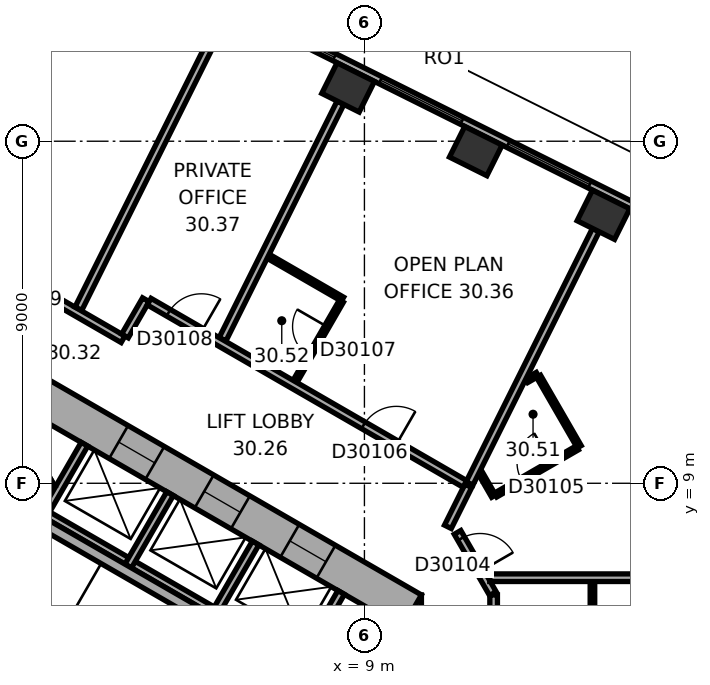
"""IFC4 building model, lengths in metres.
Left out: names, types, materials, properties, quantities, classifications, styles, units other than length and angle.
Written with IfcOpenShell. Run it as: python <this file> out.ifc"""

import sys

from ifc_helpers import new_model, si_unit, direction, frame, frame_2d, origin, origin_2d, place, context, subcontext, project, spatial, rectangle, extrude, element, fill, save


model = new_model("IFC4")
c1 = context("Model", 3, precision=1e-05, world=origin(), true_north=direction((0.0, 1.0)))
c2 = subcontext(c1, "Body", "Model", "MODEL_VIEW")
j1 = project(units=[si_unit("LENGTHUNIT", "METRE"), si_unit("PLANEANGLEUNIT", "RADIAN")], contexts=[c1])
p1 = place(None, origin())
s1 = spatial("IfcSite", under=j1, at=p1, CompositionType="ELEMENT")
p2 = place(p1, origin())
s2 = spatial("IfcBuilding", under=s1, at=p2, CompositionType="ELEMENT")
p3 = place(p2, frame((0.0, 0.0, 124.4)))
s3 = spatial("IfcBuildingStorey", under=s2, at=p3, CompositionType="ELEMENT", Elevation=124.4)
for number, where, z_axis, x_axis in (
    (1, (15.29, 16.065, 0.0), (0.0, 0.0, 1.0), (-0.895, 0.446, 0.0)),
    (2, (11.931, 17.74, 0.0), (0.0, 0.0, 1.0), (-0.895, 0.446, 0.0)),
    (3, (8.571, 19.416, 0.0), (0.0, 0.0, 1.0), (-0.895, 0.446, 0.0)),
):
    element("IfcColumn", number, at=place(p3, frame(where, z_axis=z_axis, x_axis=x_axis)), inside=s3, PredefinedType="COLUMN", context=c2, shape_type="SweptSolid", body=[
        extrude(rectangle(XDim=1.1, YDim=0.9, at=origin_2d()), origin(), (0.0, 0.0, 1.0), 3.7),
    ])
p4 = place(p3, frame((10.0, -6.062, 0.0), z_axis=(0.0, 0.0, 1.0), x_axis=(0.0, 1.0, 0.0)))
e4 = element("IfcWall", 4, at=p4, inside=s3, PredefinedType="SHEAR", context=c2, shape_type="SweptSolid", body=[
    extrude(rectangle(XDim=12.125, YDim=1.0, at=frame_2d((6.062, 0.0))), origin(), (0.0, 0.0, 1.0), 3.7),
])
p5 = place(p4, frame((6.262, 0.0, 0.0)))
e5 = element("IfcOpeningElement", 5, at=p5, cuts=e4, PredefinedType="OPENING", context=c2, shape_type="SweptSolid", body=[
    extrude(rectangle(XDim=1.5, YDim=2.1, at=frame_2d((0.75, 1.05))), frame((0.0, 0.51, 0.0), z_axis=(0.0, -1.0, 0.0), x_axis=(1.0, 0.0, 0.0)), (0.0, 0.0, 1.0), 1.02),
])
p6 = place(p4, frame((1.712, 0.0, 0.0)))
e6 = element("IfcOpeningElement", 6, at=p6, cuts=e4, PredefinedType="OPENING", context=c2, shape_type="SweptSolid", body=[
    extrude(rectangle(XDim=1.1, YDim=2.1, at=frame_2d((0.55, 1.05))), frame((0.0, 0.51, 0.0), z_axis=(0.0, -1.0, 0.0), x_axis=(1.0, 0.0, 0.0)), (0.0, 0.0, 1.0), 1.02),
])
p7 = place(p4, frame((4.312, 0.0, 0.0)))
e7 = element("IfcOpeningElement", 7, at=p7, cuts=e4, PredefinedType="OPENING", context=c2, shape_type="SweptSolid", body=[
    extrude(rectangle(XDim=1.1, YDim=2.1, at=frame_2d((0.55, 1.05))), frame((0.0, 0.51, 0.0), z_axis=(0.0, -1.0, 0.0), x_axis=(1.0, 0.0, 0.0)), (0.0, 0.0, 1.0), 1.02),
])
p8 = place(p3, frame((10.25, 5.629, 0.0), z_axis=(0.0, 0.0, 1.0), x_axis=(-0.866022616891, 0.50000482701, 0.0)))
e8 = element("IfcWall", 8, at=p8, inside=s3, PredefinedType="SHEAR", context=c2, shape_type="SweptSolid", body=[
    extrude(rectangle(XDim=12.125, YDim=1.0, at=frame_2d((6.062, 0.0))), origin(), (0.0, 0.0, 1.0), 3.7),
])
p9 = place(p8, frame((2.612, 0.0, 0.0)))
e9 = element("IfcOpeningElement", 9, at=p9, cuts=e8, PredefinedType="OPENING", context=c2, shape_type="SweptSolid", body=[
    extrude(rectangle(XDim=1.1, YDim=2.1, at=frame_2d((0.55, 1.05))), frame((0.0, 0.51, 0.0), z_axis=(0.0, -1.0, 0.0), x_axis=(1.0, 0.0, 0.0)), (0.0, 0.0, 1.0), 1.02),
])
p10 = place(p8, frame((5.212, 0.0, 0.0)))
e10 = element("IfcOpeningElement", 10, at=p10, cuts=e8, PredefinedType="OPENING", context=c2, shape_type="SweptSolid", body=[
    extrude(rectangle(XDim=1.1, YDim=2.1, at=frame_2d((0.55, 1.05))), frame((0.0, 0.51, 0.0), z_axis=(0.0, -1.0, 0.0), x_axis=(1.0, 0.0, 0.0)), (0.0, 0.0, 1.0), 1.02),
])
p11 = place(p8, frame((7.812, 0.0, 0.0)))
e11 = element("IfcOpeningElement", 11, at=p11, cuts=e8, PredefinedType="OPENING", context=c2, shape_type="SweptSolid", body=[
    extrude(rectangle(XDim=1.1, YDim=2.1, at=frame_2d((0.55, 1.05))), frame((0.0, 0.51, 0.0), z_axis=(0.0, -1.0, 0.0), x_axis=(1.0, 0.0, 0.0)), (0.0, 0.0, 1.0), 1.02),
])
p12 = place(p3, frame((19.464, 14.599, 0.0), z_axis=(0.0, 0.0, 1.0), x_axis=(-0.894935755043, 0.446195018289, 0.0)))
e12 = element("IfcWall", 12, at=p12, inside=s3, PredefinedType="STANDARD", context=c2, shape_type="SweptSolid", body=[
    extrude(rectangle(XDim=20.044, YDim=0.2, at=frame_2d((10.022, 0.0))), origin(), (0.0, 0.0, 1.0), 3.7),
])
p13 = place(p12, frame((1.313, 0.0, 0.9)))
e13 = element("IfcOpeningElement", 13, at=p13, cuts=e12, PredefinedType="OPENING", context=c2, shape_type="SweptSolid", body=[
    extrude(rectangle(XDim=2.4, YDim=2.0, at=frame_2d((1.2, 1.0))), frame((0.0, 0.11, 0.0), z_axis=(0.0, -1.0, 0.0), x_axis=(1.0, 0.0, 0.0)), (0.0, 0.0, 1.0), 0.22),
])
p14 = place(p12, frame((5.067, 0.0, 0.9)))
e14 = element("IfcOpeningElement", 14, at=p14, cuts=e12, PredefinedType="OPENING", context=c2, shape_type="SweptSolid", body=[
    extrude(rectangle(XDim=2.4, YDim=2.0, at=frame_2d((1.2, 1.0))), frame((0.0, 0.11, 0.0), z_axis=(0.0, -1.0, 0.0), x_axis=(1.0, 0.0, 0.0)), (0.0, 0.0, 1.0), 0.22),
])
p15 = place(p12, frame((8.821, 0.0, 0.9)))
e15 = element("IfcOpeningElement", 15, at=p15, cuts=e12, PredefinedType="OPENING", context=c2, shape_type="SweptSolid", body=[
    extrude(rectangle(XDim=2.4, YDim=2.0, at=frame_2d((1.2, 1.0))), frame((0.0, 0.11, 0.0), z_axis=(0.0, -1.0, 0.0), x_axis=(1.0, 0.0, 0.0)), (0.0, 0.0, 1.0), 0.22),
])
p16 = place(p12, frame((12.575, 0.0, 0.9)))
e16 = element("IfcOpeningElement", 16, at=p16, cuts=e12, PredefinedType="OPENING", context=c2, shape_type="SweptSolid", body=[
    extrude(rectangle(XDim=2.4, YDim=2.0, at=frame_2d((1.2, 1.0))), frame((0.0, 0.11, 0.0), z_axis=(0.0, -1.0, 0.0), x_axis=(1.0, 0.0, 0.0)), (0.0, 0.0, 1.0), 0.22),
])
p17 = place(p12, frame((16.329, 0.0, 0.9)))
e17 = element("IfcOpeningElement", 17, at=p17, cuts=e12, PredefinedType="OPENING", context=c2, shape_type="SweptSolid", body=[
    extrude(rectangle(XDim=2.4, YDim=2.0, at=frame_2d((1.2, 1.0))), frame((0.0, 0.11, 0.0), z_axis=(0.0, -1.0, 0.0), x_axis=(1.0, 0.0, 0.0)), (0.0, 0.0, 1.0), 0.22),
])
p18 = place(p3, frame((7.424, 4.259, 0.0), z_axis=(0.0, 0.0, 1.0), x_axis=(-0.866026010844, 0.49999894854, 0.0)))
e18 = element("IfcWall", 18, at=p18, inside=s3, PredefinedType="PARTITIONING", context=c2, shape_type="SweptSolid", body=[
    extrude(rectangle(XDim=8.0, YDim=0.2, at=frame_2d((4.0, 0.0))), origin(), (0.0, 0.0, 1.0), 3.42),
])
for number, where, z_axis, x_axis in (
    (19, (7.287, 4.222, 0.0), (0.0, 0.0, 1.0), (0.5, 0.866, 0.0)),
    (20, (5.036, 5.522, 0.0), (0.0, 0.0, 1.0), (0.5, 0.866, 0.0)),
    (21, (2.784, 6.822, 0.0), (0.0, 0.0, 1.0), (0.5, 0.866, 0.0)),
    (22, (0.532, 8.122, 0.0), (0.0, 0.0, 1.0), (0.5, 0.866, 0.0)),
):
    element("IfcWall", number, at=place(p3, frame(where, z_axis=z_axis, x_axis=x_axis)), inside=s3, PredefinedType="PARTITIONING", context=c2, shape_type="SweptSolid", body=[
        extrude(rectangle(XDim=2.2, YDim=0.2, at=frame_2d((1.1, 0.0))), origin(), (0.0, 0.0, 1.0), 3.42),
    ])
p19 = place(p3, frame((0.803, 9.009, 0.0), z_axis=(0.0, 0.0, 1.0), x_axis=(-0.866028230842, -0.499995103361, 0.0)))
e23 = element("IfcWall", 23, at=p19, inside=s3, PredefinedType="PARTITIONING", context=c2, shape_type="SweptSolid", body=[
    extrude(rectangle(XDim=5.4, YDim=0.2, at=frame_2d((2.7, 0.0))), origin(), (0.0, 0.0, 1.0), 3.42),
])
p20 = place(p3, frame((0.767, 8.872, 0.0), z_axis=(0.0, 0.0, 1.0), x_axis=(-0.499994660107, 0.866028486751, 0.0)))
e24 = element("IfcWall", 24, at=p20, inside=s3, PredefinedType="PARTITIONING", context=c2, shape_type="SweptSolid", body=[
    extrude(rectangle(XDim=2.2, YDim=0.2, at=frame_2d((1.1, 0.0))), origin(), (0.0, 0.0, 1.0), 3.42),
])
p21 = place(p3, frame((6.303, 4.617, 0.0), z_axis=(0.0, 0.0, 1.0), x_axis=(-0.866027801685, 0.499995846692, 0.0)))
e25 = element("IfcWall", 25, at=p21, inside=s3, PredefinedType="SHEAR", context=c2, shape_type="SweptSolid", body=[
    extrude(rectangle(XDim=7.06, YDim=0.3, at=frame_2d((3.53, 0.0))), origin(), (0.0, 0.0, 1.0), 3.42),
])
p22 = place(p3, frame((0.95, 13.77, 0.0), z_axis=(0.0, 0.0, 1.0), x_axis=(-1.0, 0.0, 0.0)))
e26 = element("IfcWall", 26, at=p22, inside=s3, PredefinedType="PARTITIONING", context=c2, shape_type="SweptSolid", body=[
    extrude(rectangle(XDim=1.86, YDim=0.2, at=frame_2d((0.93, 0.0))), origin(), (0.0, 0.0, 1.0), 3.42),
])
p23 = place(p22, frame((0.43, 0.0, 0.0)))
e27 = element("IfcOpeningElement", 27, at=p23, cuts=e26, PredefinedType="OPENING", context=c2, shape_type="SweptSolid", body=[
    extrude(rectangle(XDim=1.0, YDim=2.1, at=frame_2d((0.5, 1.05))), frame((0.0, 0.11, 0.0), z_axis=(0.0, -1.0, 0.0), x_axis=(1.0, 0.0, 0.0)), (0.0, 0.0, 1.0), 0.22),
])
p24 = place(p3, frame((2.648, 12.789, 0.0), z_axis=(0.0, 0.0, 1.0), x_axis=(-0.8660607342, 0.499938800931, 0.0)))
e28 = element("IfcWall", 28, at=p24, inside=s3, PredefinedType="PARTITIONING", context=c2, shape_type="SweptSolid", body=[
    extrude(rectangle(XDim=1.921, YDim=0.2, at=frame_2d((0.96, 0.0))), origin(), (0.0, 0.0, 1.0), 3.42),
])
p25 = place(p3, frame((3.249, 13.829, 0.0), z_axis=(0.0, 0.0, 1.0), x_axis=(-0.499812034598, -0.866133898465, 0.0)))
e29 = element("IfcWall", 29, at=p25, inside=s3, PredefinedType="PARTITIONING", context=c2, shape_type="SweptSolid", body=[
    extrude(rectangle(XDim=1.101, YDim=0.2, at=frame_2d((0.551, 0.0))), origin(), (0.0, 0.0, 1.0), 3.42),
])
p26 = place(p3, frame((5.01, 20.688, 0.0), z_axis=(0.0, 0.0, 1.0), x_axis=(-0.446203062394, -0.894931744386, 0.0)))
e30 = element("IfcWall", 30, at=p26, inside=s3, PredefinedType="PARTITIONING", context=c2, shape_type="SweptSolid", body=[
    extrude(rectangle(XDim=7.927, YDim=0.2, at=frame_2d((3.963, 0.0))), origin(), (0.0, 0.0, 1.0), 2.87),
])
p27 = place(p3, frame((6.468, 14.973, 0.0), z_axis=(0.0, 0.0, 1.0), x_axis=(0.865993004593, -0.500056112848, 0.0)))
e31 = element("IfcWall", 31, at=p27, inside=s3, PredefinedType="PARTITIONING", context=c2, shape_type="SweptSolid", body=[
    extrude(rectangle(XDim=2.259, YDim=0.12, at=frame_2d((1.129, 0.0))), origin(), (0.0, 0.0, 1.0), 3.42),
])
p28 = place(p3, frame((8.37, 19.013, 0.0), z_axis=(0.0, 0.0, 1.0), x_axis=(-0.446187985757, -0.894939261272, 0.0)))
e32 = element("IfcWall", 32, at=p28, inside=s3, PredefinedType="PARTITIONING", context=c2, shape_type="SweptSolid", body=[
    extrude(rectangle(XDim=6.953, YDim=0.2, at=frame_2d((3.477, 0.0))), origin(), (0.0, 0.0, 1.0), 3.42),
])
p29 = place(p3, frame((8.394, 13.792, 0.0), z_axis=(0.0, 0.0, 1.0), x_axis=(-0.500002508028, -0.866023955769, 0.0)))
e33 = element("IfcWall", 33, at=p29, inside=s3, PredefinedType="PARTITIONING", context=c2, shape_type="SweptSolid", body=[
    extrude(rectangle(XDim=2.44, YDim=0.12, at=frame_2d((1.22, 0.0))), origin(), (0.0, 0.0, 1.0), 3.42),
])
p30 = place(p29, frame((0.77, 0.0, 0.0)))
e34 = element("IfcOpeningElement", 34, at=p30, cuts=e33, PredefinedType="OPENING", context=c2, shape_type="SweptSolid", body=[
    extrude(rectangle(XDim=0.9, YDim=2.1, at=frame_2d((0.45, 1.05))), frame((0.0, 0.07, 0.0), z_axis=(0.0, -1.0, 0.0), x_axis=(1.0, 0.0, 0.0)), (0.0, 0.0, 1.0), 0.14),
])
p31 = place(p3, frame((11.196, 7.854, 0.0), z_axis=(0.0, 0.0, 1.0), x_axis=(0.446241040303, 0.894912808015, 0.0)))
e35 = element("IfcWall", 35, at=p31, inside=s3, PredefinedType="PARTITIONING", context=c2, shape_type="SweptSolid", body=[
    extrude(rectangle(XDim=1.205, YDim=0.2, at=frame_2d((0.603, 0.0))), origin(), (0.0, 0.0, 1.0), 3.42),
])
p32 = place(p3, frame((11.646, 8.981, 0.0), z_axis=(0.0, 0.0, 1.0), x_axis=(-0.866027142779, 0.499996987961, 0.0)))
e36 = element("IfcWall", 36, at=p32, inside=s3, PredefinedType="PARTITIONING", context=c2, shape_type="SweptSolid", body=[
    extrude(rectangle(XDim=9.597, YDim=0.2, at=frame_2d((4.798, 0.0))), origin(), (0.0, 0.0, 1.0), 3.42),
])
p33 = place(p32, frame((2.086, 0.0, 0.0)))
e37 = element("IfcOpeningElement", 37, at=p33, cuts=e36, PredefinedType="OPENING", context=c2, shape_type="SweptSolid", body=[
    extrude(rectangle(XDim=1.0, YDim=2.1, at=frame_2d((0.5, 1.05))), frame((0.0, 0.11, 0.0), z_axis=(0.0, -1.0, 0.0), x_axis=(1.0, 0.0, 0.0)), (0.0, 0.0, 1.0), 0.22),
])
p34 = place(p32, frame((8.01, 0.0, 0.0)))
e38 = element("IfcOpeningElement", 38, at=p34, cuts=e36, PredefinedType="OPENING", context=c2, shape_type="SweptSolid", body=[
    extrude(rectangle(XDim=1.0, YDim=2.1, at=frame_2d((0.5, 1.05))), frame((0.0, 0.11, 0.0), z_axis=(0.0, -1.0, 0.0), x_axis=(1.0, 0.0, 0.0)), (0.0, 0.0, 1.0), 0.22),
])
p35 = place(p3, frame((12.38, 6.097, 0.0), z_axis=(0.0, 0.0, 1.0), x_axis=(-0.499964847546, 0.866045698112, 0.0)))
e39 = element("IfcWall", 39, at=p35, inside=s3, PredefinedType="PARTITIONING", context=c2, shape_type="SweptSolid", body=[
    extrude(rectangle(XDim=1.86, YDim=0.2, at=frame_2d((0.93, 0.0))), origin(), (0.0, 0.0, 1.0), 3.42),
])
p36 = place(p35, frame((0.672, 0.0, 0.0)))
e40 = element("IfcOpeningElement", 40, at=p36, cuts=e39, PredefinedType="OPENING", context=c2, shape_type="SweptSolid", body=[
    extrude(rectangle(XDim=1.0, YDim=2.1, at=frame_2d((0.5, 1.05))), frame((0.0, 0.11, 0.0), z_axis=(0.0, -1.0, 0.0), x_axis=(1.0, 0.0, 0.0)), (0.0, 0.0, 1.0), 0.22),
])
p37 = place(p3, frame((12.4, 0.201, 0.0), z_axis=(0.0, 0.0, 1.0), x_axis=(0.0, 1.0, 0.0)))
e41 = element("IfcWall", 41, at=p37, inside=s3, PredefinedType="PARTITIONING", context=c2, shape_type="SweptSolid", body=[
    extrude(rectangle(XDim=5.861, YDim=0.2, at=frame_2d((2.931, 0.0))), origin(), (0.0, 0.0, 1.0), 3.42),
])
p38 = place(p37, frame((1.306, 0.0, 0.0)))
e42 = element("IfcOpeningElement", 42, at=p38, cuts=e41, PredefinedType="OPENING", context=c2, shape_type="SweptSolid", body=[
    extrude(rectangle(XDim=1.0, YDim=2.1, at=frame_2d((0.5, 1.05))), frame((0.0, 0.11, 0.0), z_axis=(0.0, -1.0, 0.0), x_axis=(1.0, 0.0, 0.0)), (0.0, 0.0, 1.0), 0.22),
])
p39 = place(p3, frame((12.401, 8.661, 0.0), z_axis=(0.0, 0.0, 1.0), x_axis=(-0.499831418649, 0.866122712398, 0.0)))
e43 = element("IfcWall", 43, at=p39, inside=s3, PredefinedType="PARTITIONING", context=c2, shape_type="SweptSolid", body=[
    extrude(rectangle(XDim=0.711, YDim=0.12, at=frame_2d((0.355, 0.0))), origin(), (0.0, 0.0, 1.0), 3.42),
])
p40 = place(p3, frame((13.269, 11.702, 0.0), z_axis=(0.0, 0.0, 1.0), x_axis=(0.865936922628, 0.500153222552, 0.0)))
e44 = element("IfcWall", 44, at=p40, inside=s3, PredefinedType="PARTITIONING", context=c2, shape_type="SweptSolid", body=[
    extrude(rectangle(XDim=0.327, YDim=0.12, at=frame_2d((0.164, 0.0))), origin(), (0.0, 0.0, 1.0), 3.42),
])
p41 = place(p3, frame((13.583, 11.814, 0.0), z_axis=(0.0, 0.0, 1.0), x_axis=(0.500028586798, -0.86600889856, 0.0)))
e45 = element("IfcWall", 45, at=p41, inside=s3, PredefinedType="PARTITIONING", context=c2, shape_type="SweptSolid", body=[
    extrude(rectangle(XDim=2.14, YDim=0.12, at=frame_2d((1.07, 0.0))), origin(), (0.0, 0.0, 1.0), 3.42),
])
p42 = place(p3, frame((14.601, 9.931, 0.0), z_axis=(0.0, 0.0, 1.0), x_axis=(-0.866023285932, -0.50000366821, 0.0)))
e46 = element("IfcWall", 46, at=p42, inside=s3, PredefinedType="PARTITIONING", context=c2, shape_type="SweptSolid", body=[
    extrude(rectangle(XDim=2.48, YDim=0.12, at=frame_2d((1.24, 0.0))), origin(), (0.0, 0.0, 1.0), 3.42),
])
p43 = place(p42, frame((0.79, 0.0, 0.0)))
e47 = element("IfcOpeningElement", 47, at=p43, cuts=e46, PredefinedType="OPENING", context=c2, shape_type="SweptSolid", body=[
    extrude(rectangle(XDim=0.9, YDim=2.1, at=frame_2d((0.45, 1.05))), frame((0.0, 0.07, 0.0), z_axis=(0.0, -1.0, 0.0), x_axis=(1.0, 0.0, 0.0)), (0.0, 0.0, 1.0), 0.14),
])
p44 = place(p3, frame((15.0, 6.415, 0.0), z_axis=(0.0, 0.0, 1.0), x_axis=(0.0, -1.0, 0.0)))
e48 = element("IfcWall", 48, at=p44, inside=s3, PredefinedType="PARTITIONING", context=c2, shape_type="SweptSolid", body=[
    extrude(rectangle(XDim=2.493, YDim=0.12, at=frame_2d((1.247, 0.0))), origin(), (0.0, 0.0, 1.0), 3.42),
])
p45 = place(p3, frame((15.09, 15.663, 0.0), z_axis=(0.0, 0.0, 1.0), x_axis=(-0.446203977428, -0.89493128816, 0.0)))
e49 = element("IfcWall", 49, at=p45, inside=s3, PredefinedType="PARTITIONING", context=c2, shape_type="SweptSolid", body=[
    extrude(rectangle(XDim=7.45, YDim=0.2, at=frame_2d((3.725, 0.0))), origin(), (0.0, 0.0, 1.0), 3.42),
])
p46 = place(p3, frame((20.75, 6.515, 0.0), z_axis=(0.0, 0.0, 1.0), x_axis=(-1.0, 0.0, 0.0)))
e50 = element("IfcWall", 50, at=p46, inside=s3, PredefinedType="PARTITIONING", context=c2, shape_type="SweptSolid", body=[
    extrude(rectangle(XDim=8.452, YDim=0.2, at=frame_2d((4.226, 0.0))), origin(), (0.0, 0.0, 1.0), 3.42),
])
p47 = place(p14, origin())
e51 = element("IfcWindow", 51, at=p47, inside=s3, PartitioningType="SINGLE_PANEL", PredefinedType="WINDOW", context=c2, shape_type="SweptSolid", body=[
    extrude(rectangle(XDim=2.4, YDim=2.0, at=frame_2d((1.2, 1.0))), frame((0.0, 0.03, 0.0), z_axis=(0.0, -1.0, 0.0), x_axis=(1.0, 0.0, 0.0)), (0.0, 0.0, 1.0), 0.06),
])
fill(e14, e51)
p48 = place(p15, origin())
e52 = element("IfcWindow", 52, at=p48, inside=s3, PartitioningType="SINGLE_PANEL", PredefinedType="WINDOW", context=c2, shape_type="SweptSolid", body=[
    extrude(rectangle(XDim=2.4, YDim=2.0, at=frame_2d((1.2, 1.0))), frame((0.0, 0.03, 0.0), z_axis=(0.0, -1.0, 0.0), x_axis=(1.0, 0.0, 0.0)), (0.0, 0.0, 1.0), 0.06),
])
fill(e15, e52)
p49 = place(p16, origin())
e53 = element("IfcWindow", 53, at=p49, inside=s3, PartitioningType="SINGLE_PANEL", PredefinedType="WINDOW", context=c2, shape_type="SweptSolid", body=[
    extrude(rectangle(XDim=2.4, YDim=2.0, at=frame_2d((1.2, 1.0))), frame((0.0, 0.03, 0.0), z_axis=(0.0, -1.0, 0.0), x_axis=(1.0, 0.0, 0.0)), (0.0, 0.0, 1.0), 0.06),
])
fill(e16, e53)
p50 = place(p9, origin())
e54 = element("IfcDoor", 54, at=p50, inside=s3, OperationType="DOUBLE_DOOR_SLIDING", PredefinedType="DOOR", context=c2, shape_type="SweptSolid", body=[
    extrude(rectangle(XDim=1.1, YDim=2.1, at=frame_2d((0.55, 1.05))), frame((0.0, 0.025, 0.0), z_axis=(0.0, -1.0, 0.0), x_axis=(1.0, 0.0, 0.0)), (0.0, 0.0, 1.0), 0.05),
])
fill(e9, e54)
p51 = place(p10, origin())
e55 = element("IfcDoor", 55, at=p51, inside=s3, OperationType="DOUBLE_DOOR_SLIDING", PredefinedType="DOOR", context=c2, shape_type="SweptSolid", body=[
    extrude(rectangle(XDim=1.1, YDim=2.1, at=frame_2d((0.55, 1.05))), frame((0.0, 0.025, 0.0), z_axis=(0.0, -1.0, 0.0), x_axis=(1.0, 0.0, 0.0)), (0.0, 0.0, 1.0), 0.05),
])
fill(e10, e55)
p52 = place(p11, origin())
e56 = element("IfcDoor", 56, at=p52, inside=s3, OperationType="DOUBLE_DOOR_SLIDING", PredefinedType="DOOR", context=c2, shape_type="SweptSolid", body=[
    extrude(rectangle(XDim=1.1, YDim=2.1, at=frame_2d((0.55, 1.05))), frame((0.0, 0.025, 0.0), z_axis=(0.0, -1.0, 0.0), x_axis=(1.0, 0.0, 0.0)), (0.0, 0.0, 1.0), 0.05),
])
fill(e11, e56)
p53 = place(p36, origin())
e57 = element("IfcDoor", 57, at=p53, inside=s3, OperationType="SINGLE_SWING_LEFT", PredefinedType="DOOR", context=c2, shape_type="SweptSolid", body=[
    extrude(rectangle(XDim=1.0, YDim=2.1, at=frame_2d((0.5, 1.05))), frame((0.0, 0.025, 0.0), z_axis=(0.0, -1.0, 0.0), x_axis=(1.0, 0.0, 0.0)), (0.0, 0.0, 1.0), 0.05),
])
fill(e40, e57)
p54 = place(p43, origin())
e58 = element("IfcDoor", 58, at=p54, inside=s3, OperationType="SINGLE_SWING_LEFT", PredefinedType="DOOR", context=c2, shape_type="SweptSolid", body=[
    extrude(rectangle(XDim=0.9, YDim=2.1, at=frame_2d((0.45, 1.05))), frame((0.0, 0.025, 0.0), z_axis=(0.0, -1.0, 0.0), x_axis=(1.0, 0.0, 0.0)), (0.0, 0.0, 1.0), 0.05),
])
fill(e47, e58)
p55 = place(p33, origin())
e59 = element("IfcDoor", 59, at=p55, inside=s3, OperationType="SINGLE_SWING_LEFT", PredefinedType="DOOR", context=c2, shape_type="SweptSolid", body=[
    extrude(rectangle(XDim=1.0, YDim=2.1, at=frame_2d((0.5, 1.05))), frame((0.0, 0.025, 0.0), z_axis=(0.0, -1.0, 0.0), x_axis=(1.0, 0.0, 0.0)), (0.0, 0.0, 1.0), 0.05),
])
fill(e37, e59)
p56 = place(p30, origin())
e60 = element("IfcDoor", 60, at=p56, inside=s3, OperationType="SINGLE_SWING_LEFT", PredefinedType="DOOR", context=c2, shape_type="SweptSolid", body=[
    extrude(rectangle(XDim=0.9, YDim=2.1, at=frame_2d((0.45, 1.05))), frame((0.0, 0.025, 0.0), z_axis=(0.0, -1.0, 0.0), x_axis=(1.0, 0.0, 0.0)), (0.0, 0.0, 1.0), 0.05),
])
fill(e34, e60)
p57 = place(p34, origin())
e61 = element("IfcDoor", 61, at=p57, inside=s3, OperationType="SINGLE_SWING_LEFT", PredefinedType="DOOR", context=c2, shape_type="SweptSolid", body=[
    extrude(rectangle(XDim=1.0, YDim=2.1, at=frame_2d((0.5, 1.05))), frame((0.0, 0.025, 0.0), z_axis=(0.0, -1.0, 0.0), x_axis=(1.0, 0.0, 0.0)), (0.0, 0.0, 1.0), 0.05),
])
fill(e38, e61)
save(model, sys.argv[1])
